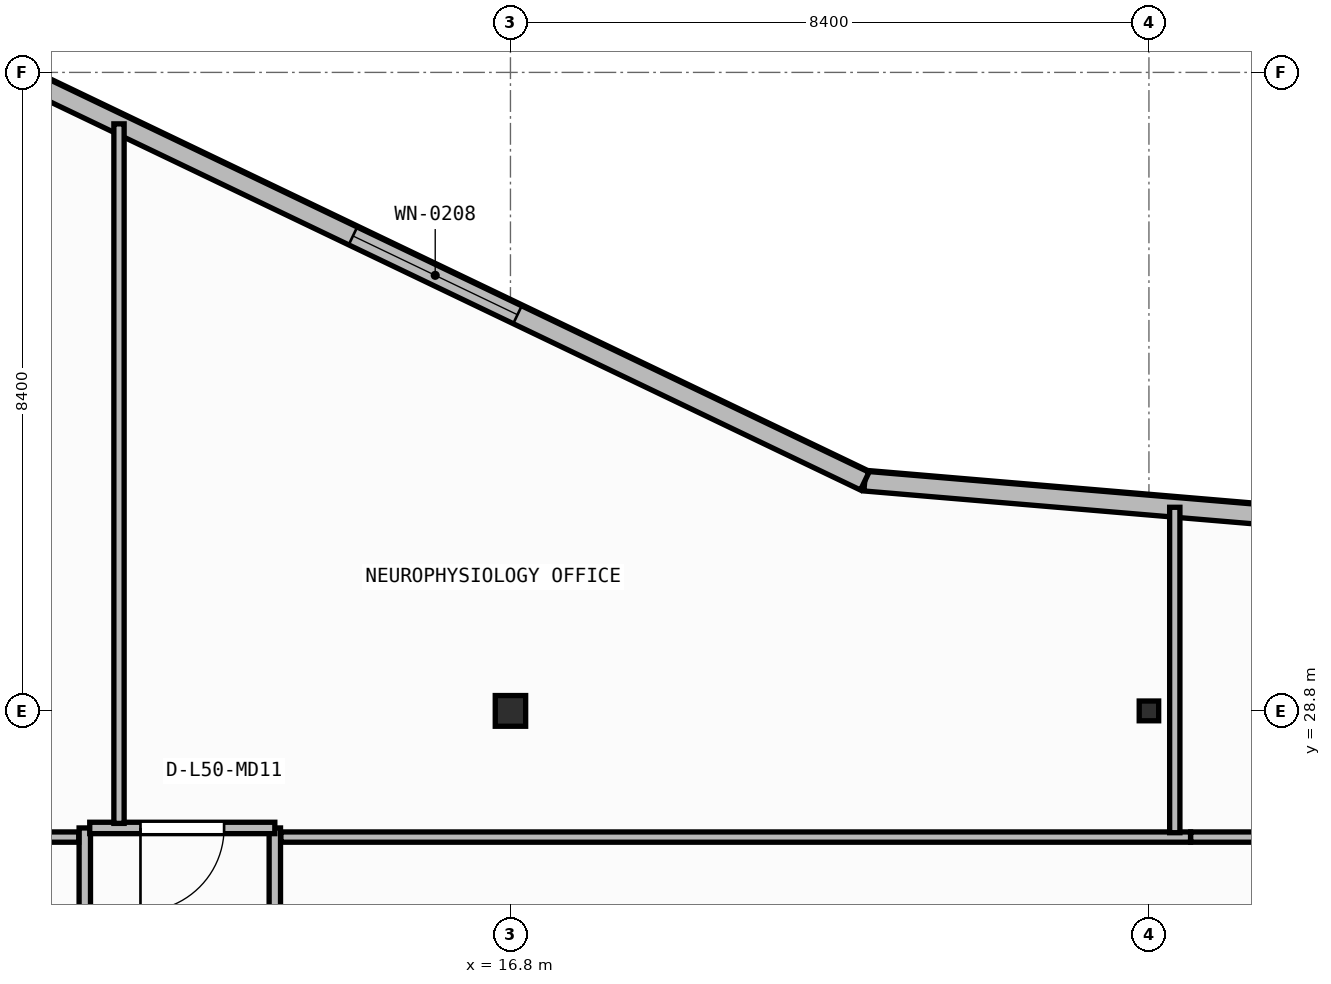
"""IFC4 building model, lengths in metres.
Left out: names, types, materials, properties, quantities, classifications, styles, units other than length and angle.
Written with IfcOpenShell. Run it as: python <this file> out.ifc"""

import sys

from ifc_helpers import new_model, si_unit, direction, frame, frame_2d, origin, origin_2d, place, context, subcontext, project, spatial, rectangle, i_section, extrude, element, fill, save


model = new_model("IFC4")
c1 = context("Model", 3, precision=1e-05, world=origin(), true_north=direction((0.0, 1.0)))
c2 = subcontext(c1, "Body", "Model", "MODEL_VIEW")
j1 = project(units=[si_unit("LENGTHUNIT", "METRE"), si_unit("PLANEANGLEUNIT", "RADIAN")], contexts=[c1])
p1 = place(None, origin())
s1 = spatial("IfcSite", under=j1, at=p1, CompositionType="ELEMENT")
p2 = place(p1, origin())
s2 = spatial("IfcBuilding", under=s1, at=p2, CompositionType="ELEMENT")
p3 = place(p2, frame((0.0, 0.0, 203.95)))
s3 = spatial("IfcBuildingStorey", under=s2, at=p3, CompositionType="ELEMENT", Elevation=203.95)
p4 = place(p3, frame((16.8, 28.8, 0.0), z_axis=(0.0, 0.0, 1.0), x_axis=(1.0, 0.0, 0.0)))
e1 = element("IfcColumn", 1, at=p4, inside=s3, PredefinedType="COLUMN", context=c2, shape_type="SweptSolid", body=[
    extrude(i_section(OverallWidth=0.4, OverallDepth=0.404, WebThickness=0.02, FlangeThickness=0.032, at=origin_2d()), origin(), (0.0, 0.0, 1.0), 3.95),
])
p5 = place(p3, frame((25.2, 28.8, 0.0), z_axis=(0.0, 0.0, 1.0), x_axis=(1.0, 0.0, 0.0)))
e2 = element("IfcColumn", 2, at=p5, inside=s3, PredefinedType="COLUMN", context=c2, shape_type="SweptSolid", body=[
    extrude(i_section(OverallWidth=0.256, OverallDepth=0.26, WebThickness=0.01, FlangeThickness=0.017, FilletRadius=0.013, at=origin_2d()), origin(), (0.0, 0.0, 1.0), 3.95),
])
p6 = place(p3, frame((34.815, 30.696, 0.0), z_axis=(0.0, 0.0, 1.0), x_axis=(-0.996454704935, 0.084130975344, 0.0)))
e3 = element("IfcWall", 3, at=p6, inside=s3, PredefinedType="STANDARD", context=c2, shape_type="SweptSolid", body=[
    extrude(rectangle(XDim=13.401, YDim=0.26, at=frame_2d((6.701, 0.0))), origin(), (0.0, 0.0, 1.0), 3.71),
])
p7 = place(p6, frame((5.5, 0.0, 0.9)))
e4 = element("IfcOpeningElement", 4, at=p7, cuts=e3, PredefinedType="OPENING", context=c2, shape_type="SweptSolid", body=[
    extrude(rectangle(XDim=2.4, YDim=1.65, at=frame_2d((1.2, 0.825))), frame((0.0, 0.14, 0.0), z_axis=(0.0, -1.0, 0.0), x_axis=(1.0, 0.0, 0.0)), (0.0, 0.0, 1.0), 0.28),
])
p8 = place(p3, frame((21.461, 31.823, 0.0), z_axis=(0.0, 0.0, 1.0), x_axis=(-0.901858094827, 0.432032379336, 0.0)))
e5 = element("IfcWall", 5, at=p8, inside=s3, PredefinedType="STANDARD", context=c2, shape_type="SweptSolid", body=[
    extrude(rectangle(XDim=12.532, YDim=0.26, at=frame_2d((6.266, 0.0))), origin(), (0.0, 0.0, 1.0), 3.71),
])
p9 = place(p8, frame((5.066, 0.0, 0.9)))
e6 = element("IfcOpeningElement", 6, at=p9, cuts=e5, PredefinedType="OPENING", context=c2, shape_type="SweptSolid", body=[
    extrude(rectangle(XDim=2.4, YDim=1.65, at=frame_2d((1.2, 0.825))), frame((0.0, 0.14, 0.0), z_axis=(0.0, -1.0, 0.0), x_axis=(1.0, 0.0, 0.0)), (0.0, 0.0, 1.0), 0.28),
])
p10 = place(p3, frame((11.2, 27.26, 0.0), z_axis=(0.0, 0.0, 1.0), x_axis=(0.0, -1.0, 0.0)))
e7 = element("IfcWall", 7, at=p10, inside=s3, PredefinedType="PARTITIONING", context=c2, shape_type="SweptSolid", body=[
    extrude(rectangle(XDim=6.592, YDim=0.15, at=frame_2d((3.296, 0.0))), origin(), (0.0, 0.0, 1.0), 3.71),
])
p11 = place(p10, frame((2.746, 0.0, 0.0)))
e8 = element("IfcOpeningElement", 8, at=p11, cuts=e7, PredefinedType="OPENING", context=c2, shape_type="SweptSolid", body=[
    extrude(rectangle(XDim=1.1, YDim=2.1, at=frame_2d((0.55, 1.05))), frame((0.0, 0.085, 0.0), z_axis=(0.0, -1.0, 0.0), x_axis=(1.0, 0.0, 0.0)), (0.0, 0.0, 1.0), 0.17),
])
p12 = place(p3, frame((13.7, 20.668, 0.0), z_axis=(0.0, 0.0, 1.0), x_axis=(0.0, 1.0, 0.0)))
e9 = element("IfcWall", 9, at=p12, inside=s3, PredefinedType="PARTITIONING", context=c2, shape_type="SweptSolid", body=[
    extrude(rectangle(XDim=6.592, YDim=0.15, at=frame_2d((3.296, 0.0))), origin(), (0.0, 0.0, 1.0), 3.71),
])
p13 = place(p12, frame((2.746, 0.0, 0.0)))
e10 = element("IfcOpeningElement", 10, at=p13, cuts=e9, PredefinedType="OPENING", context=c2, shape_type="SweptSolid", body=[
    extrude(rectangle(XDim=1.1, YDim=2.1, at=frame_2d((0.55, 1.05))), frame((0.0, 0.085, 0.0), z_axis=(0.0, -1.0, 0.0), x_axis=(1.0, 0.0, 0.0)), (0.0, 0.0, 1.0), 0.17),
])
p14 = place(p3, frame((13.7, 27.26, 0.0), z_axis=(0.0, 0.0, 1.0), x_axis=(-1.0, 0.0, 0.0)))
e11 = element("IfcWall", 11, at=p14, inside=s3, PredefinedType="PARTITIONING", context=c2, shape_type="SweptSolid", body=[
    extrude(rectangle(XDim=2.435, YDim=0.15, at=frame_2d((1.218, 0.0))), origin(), (0.0, 0.0, 1.0), 3.71),
])
p15 = place(p14, frame((0.667, 0.0, 0.0)))
e12 = element("IfcOpeningElement", 12, at=p15, cuts=e11, PredefinedType="OPENING", context=c2, shape_type="SweptSolid", body=[
    extrude(rectangle(XDim=1.1, YDim=2.1, at=frame_2d((0.55, 1.05))), frame((0.0, 0.085, 0.0), z_axis=(0.0, -1.0, 0.0), x_axis=(1.0, 0.0, 0.0)), (0.0, 0.0, 1.0), 0.17),
])
p16 = place(p3, frame((11.12, 27.14, 0.0), z_axis=(0.0, 0.0, 1.0), x_axis=(-1.0, 0.0, 0.0)))
e13 = element("IfcWall", 13, at=p16, inside=s3, PredefinedType="PARTITIONING", context=c2, shape_type="SweptSolid", body=[
    extrude(rectangle(XDim=10.88, YDim=0.135, at=frame_2d((5.44, 0.0))), origin(), (0.0, 0.0, 1.0), 3.71),
])
p17 = place(p16, frame((5.828, 0.0, 0.0)))
e14 = element("IfcOpeningElement", 14, at=p17, cuts=e13, PredefinedType="OPENING", context=c2, shape_type="SweptSolid", body=[
    extrude(rectangle(XDim=1.1, YDim=2.1, at=frame_2d((0.55, 1.05))), frame((0.0, 0.077, 0.0), z_axis=(0.0, -1.0, 0.0), x_axis=(1.0, 0.0, 0.0)), (0.0, 0.0, 1.0), 0.155),
])
p18 = place(p3, frame((25.748, 27.14, 0.0), z_axis=(0.0, 0.0, 1.0), x_axis=(-1.0, 0.0, 0.0)))
e15 = element("IfcWall", 15, at=p18, inside=s3, PredefinedType="PARTITIONING", context=c2, shape_type="SweptSolid", body=[
    extrude(rectangle(XDim=11.968, YDim=0.135, at=frame_2d((5.984, 0.0))), origin(), (0.0, 0.0, 1.0), 3.71),
])
p19 = place(p3, frame((29.93, 27.14, 0.0), z_axis=(0.0, 0.0, 1.0), x_axis=(-1.0, 0.0, 0.0)))
e16 = element("IfcWall", 16, at=p19, inside=s3, PredefinedType="PARTITIONING", context=c2, shape_type="SweptSolid", body=[
    extrude(rectangle(XDim=4.18, YDim=0.135, at=frame_2d((2.09, 0.0))), origin(), (0.0, 0.0, 1.0), 3.71),
])
p20 = place(p19, frame((0.267, 0.0, 0.0)))
e17 = element("IfcOpeningElement", 17, at=p20, cuts=e16, PredefinedType="OPENING", context=c2, shape_type="SweptSolid", body=[
    extrude(rectangle(XDim=1.1, YDim=2.1, at=frame_2d((0.55, 1.05))), frame((0.0, 0.077, 0.0), z_axis=(0.0, -1.0, 0.0), x_axis=(1.0, 0.0, 0.0)), (0.0, 0.0, 1.0), 0.155),
])
p21 = place(p3, frame((11.65, 27.32, 0.0), z_axis=(0.0, 0.0, 1.0), x_axis=(0.0, 1.0, 0.0)))
e18 = element("IfcWall", 18, at=p21, inside=s3, PredefinedType="PARTITIONING", context=c2, shape_type="SweptSolid", body=[
    extrude(rectangle(XDim=9.203, YDim=0.135, at=frame_2d((4.602, 0.0))), origin(), (0.0, 0.0, 1.0), 3.71),
])
p22 = place(p3, frame((25.54, 27.198, 0.0), z_axis=(0.0, 0.0, 1.0), x_axis=(0.0, 1.0, 0.0)))
e19 = element("IfcWall", 19, at=p22, inside=s3, PredefinedType="PARTITIONING", context=c2, shape_type="SweptSolid", body=[
    extrude(rectangle(XDim=4.281, YDim=0.135, at=frame_2d((2.141, 0.0))), origin(), (0.0, 0.0, 1.0), 3.157),
])
p23 = place(p9, origin())
e20 = element("IfcWindow", 20, at=p23, inside=s3, PartitioningType="SINGLE_PANEL", PredefinedType="WINDOW", context=c2, shape_type="SweptSolid", body=[
    extrude(rectangle(XDim=2.4, YDim=1.65, at=frame_2d((1.2, 0.825))), frame((0.0, 0.03, 0.0), z_axis=(0.0, -1.0, 0.0), x_axis=(1.0, 0.0, 0.0)), (0.0, 0.0, 1.0), 0.06),
])
fill(e6, e20)
p24 = place(p15, origin())
e21 = element("IfcDoor", 21, at=p24, inside=s3, OperationType="SINGLE_SWING_RIGHT", PredefinedType="DOOR", context=c2, shape_type="SweptSolid", body=[
    extrude(rectangle(XDim=1.1, YDim=2.1, at=frame_2d((0.55, 1.05))), frame((0.0, 0.025, 0.0), z_axis=(0.0, -1.0, 0.0), x_axis=(1.0, 0.0, 0.0)), (0.0, 0.0, 1.0), 0.05),
])
fill(e12, e21)
save(model, sys.argv[1])
